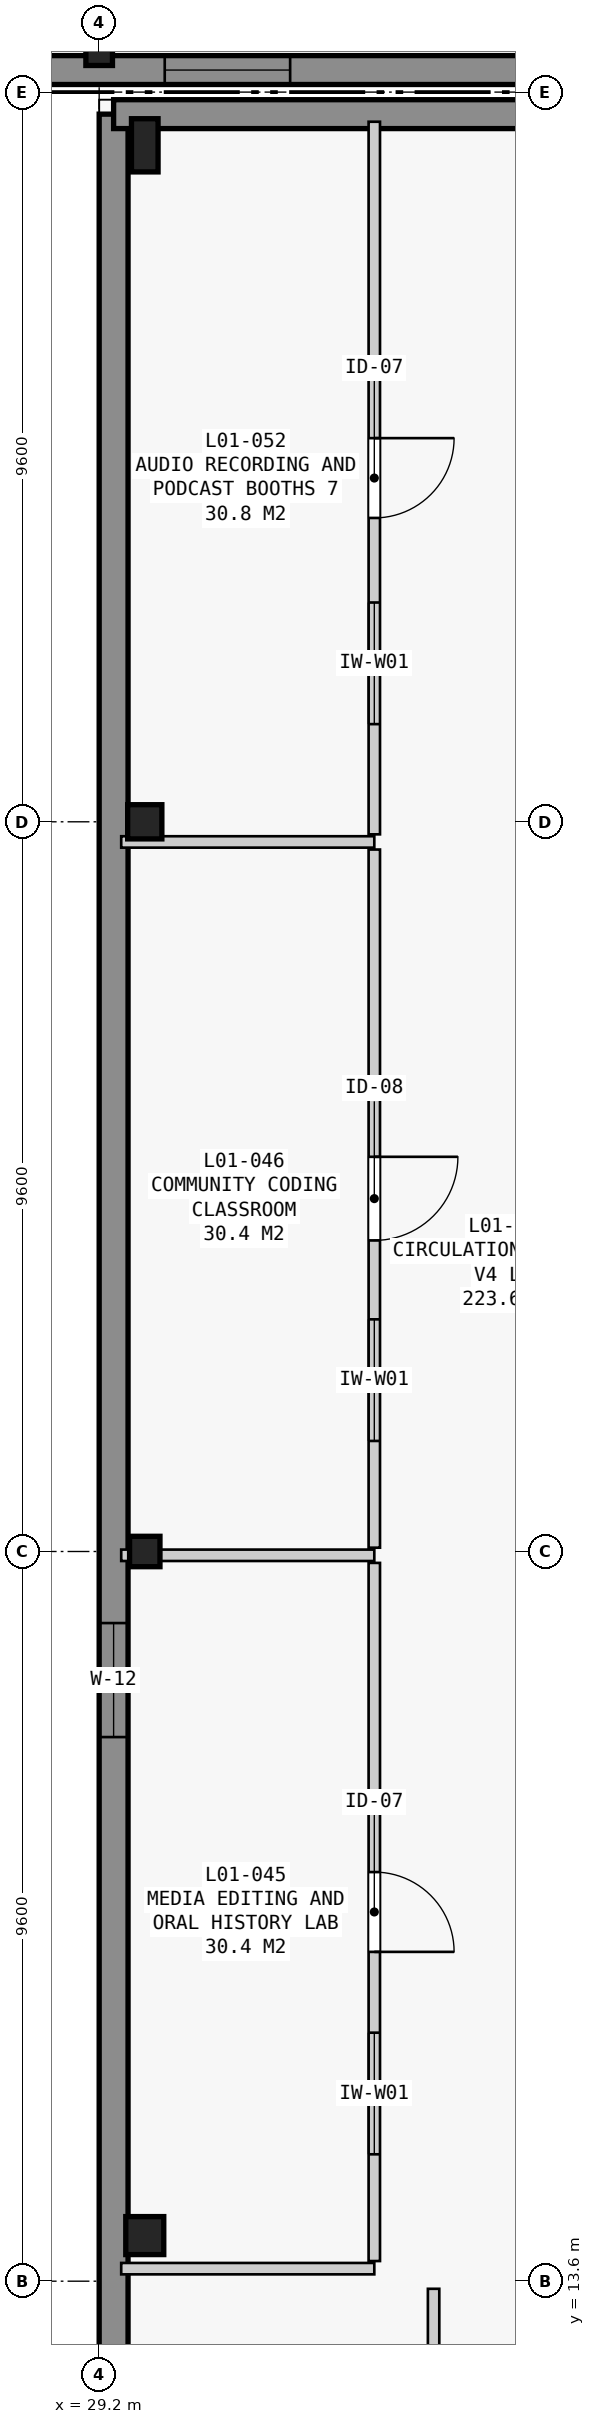
"""IFC4 building model, lengths in metres.
Left out: names, types, materials, properties, quantities, classifications, styles, units other than length and angle.
Written with IfcOpenShell. Run it as: python <this file> out.ifc"""

import sys

from ifc_helpers import new_model, si_unit, direction, frame, frame_2d, origin, origin_2d, place, context, subcontext, project, spatial, rectangle, extrude, element, fill, save


model = new_model("IFC4")
c1 = context("Model", 3, precision=1e-05, world=origin(), true_north=direction((0.0, 1.0)))
c2 = subcontext(c1, "Body", "Model", "MODEL_VIEW")
j1 = project(units=[si_unit("LENGTHUNIT", "METRE"), si_unit("PLANEANGLEUNIT", "RADIAN")], contexts=[c1])
p1 = place(None, origin())
s1 = spatial("IfcSite", under=j1, at=p1, CompositionType="ELEMENT")
p2 = place(p1, origin())
s2 = spatial("IfcBuilding", under=s1, at=p2, CompositionType="ELEMENT")
p3 = place(p2, frame((0.0, 0.0, 5.4)))
s3 = spatial("IfcBuildingStorey", under=s2, at=p3, CompositionType="ELEMENT", Elevation=5.4)
p4 = place(p3, frame((29.8, 14.2, 0.0), z_axis=(0.0, 0.0, 1.0), x_axis=(1.0, 0.0, 0.0)))
e1 = element("IfcColumn", 1, at=p4, inside=s3, PredefinedType="COLUMN", context=c2, shape_type="SweptSolid", body=[
    extrude(rectangle(XDim=0.5, YDim=0.5, at=origin_2d()), origin(), (0.0, 0.0, 1.0), 4.2),
])
p5 = place(p3, frame((29.8, 23.2, 0.0), z_axis=(0.0, 0.0, 1.0), x_axis=(1.0, 0.0, 0.0)))
e2 = element("IfcColumn", 2, at=p5, inside=s3, PredefinedType="COLUMN", context=c2, shape_type="SweptSolid", body=[
    extrude(rectangle(XDim=0.4, YDim=0.4, at=origin_2d()), origin(), (0.0, 0.0, 1.0), 4.2),
])
p6 = place(p3, frame((29.8, 32.8, 0.0), z_axis=(0.0, 0.0, 1.0), x_axis=(1.0, 0.0, 0.0)))
e3 = element("IfcColumn", 3, at=p6, inside=s3, PredefinedType="COLUMN", context=c2, shape_type="SweptSolid", body=[
    extrude(rectangle(XDim=0.45, YDim=0.45, at=origin_2d()), origin(), (0.0, 0.0, 1.0), 4.2),
])
for number, where, z_axis, x_axis in (
    (4, (29.8, 41.7, 0.0), (0.0, 0.0, 1.0), (1.0, 0.0, 0.0)),
    (5, (29.2, 43.1, 0.0), (0.0, 0.0, 1.0), (1.0, 0.0, 0.0)),
):
    element("IfcColumn", number, at=place(p3, frame(where, z_axis=z_axis, x_axis=x_axis)), inside=s3, PredefinedType="COLUMN", context=c2, shape_type="SweptSolid", body=[
        extrude(rectangle(XDim=0.35, YDim=0.7, at=origin_2d()), origin(), (0.0, 0.0, 1.0), 4.2),
    ])
p7 = place(p3, frame((29.39, 4.19, 0.0), z_axis=(0.0, 0.0, 1.0), x_axis=(0.0, 1.0, 0.0)))
e6 = element("IfcWall", 6, at=p7, inside=s3, PredefinedType="STANDARD", context=c2, shape_type="SweptSolid", body=[
    extrude(rectangle(XDim=37.92, YDim=0.38, at=frame_2d((18.96, 0.0))), origin(), (0.0, 0.0, 1.0), 3.94),
])
p8 = place(p7, frame((16.568, 0.0, 0.96)))
e7 = element("IfcOpeningElement", 7, at=p8, cuts=e6, PredefinedType="OPENING", context=c2, shape_type="SweptSolid", body=[
    extrude(rectangle(XDim=1.5, YDim=2.6, at=frame_2d((0.75, 1.3))), frame((0.0, 0.2, 0.0), z_axis=(0.0, -1.0, 0.0), x_axis=(1.0, 0.0, 0.0)), (0.0, 0.0, 1.0), 0.4),
])
p9 = place(p3, frame((29.39, 42.11, 0.0), z_axis=(0.0, 0.0, 1.0), x_axis=(1.0, 0.0, 0.0)))
e8 = element("IfcWall", 8, at=p9, inside=s3, PredefinedType="STANDARD", context=c2, shape_type="SweptSolid", body=[
    extrude(rectangle(XDim=24.72, YDim=0.38, at=frame_2d((12.36, 0.0))), origin(), (0.0, 0.0, 1.0), 3.94),
])
p10 = place(p9, frame((10.91, 0.0, 0.0)))
e9 = element("IfcOpeningElement", 9, at=p10, cuts=e8, PredefinedType="OPENING", context=c2, shape_type="SweptSolid", body=[
    extrude(rectangle(XDim=1.8, YDim=2.2, at=frame_2d((0.9, 1.1))), frame((0.0, 0.2, 0.0), z_axis=(0.0, -1.0, 0.0), x_axis=(1.0, 0.0, 0.0)), (0.0, 0.0, 1.0), 0.4),
])
p11 = place(p3, frame((45.71, 42.69, 0.0), z_axis=(0.0, 0.0, 1.0), x_axis=(-1.0, 0.0, 0.0)))
e10 = element("IfcWall", 10, at=p11, inside=s3, PredefinedType="STANDARD", context=c2, shape_type="SweptSolid", body=[
    extrude(rectangle(XDim=33.12, YDim=0.38, at=frame_2d((16.56, 0.0))), origin(), (0.0, 0.0, 1.0), 3.94),
])
p12 = place(p11, frame((3.61, 0.0, 0.0)))
e11 = element("IfcOpeningElement", 11, at=p12, cuts=e10, PredefinedType="OPENING", context=c2, shape_type="SweptSolid", body=[
    extrude(rectangle(XDim=1.8, YDim=2.2, at=frame_2d((0.9, 1.1))), frame((0.0, 0.2, 0.0), z_axis=(0.0, -1.0, 0.0), x_axis=(1.0, 0.0, 0.0)), (0.0, 0.0, 1.0), 0.4),
])
p13 = place(p11, frame((13.997, 0.0, 1.05)))
e12 = element("IfcOpeningElement", 12, at=p13, cuts=e10, PredefinedType="OPENING", context=c2, shape_type="SweptSolid", body=[
    extrude(rectangle(XDim=1.65, YDim=2.2, at=frame_2d((0.825, 1.1))), frame((0.0, 0.2, 0.0), z_axis=(0.0, -1.0, 0.0), x_axis=(1.0, 0.0, 0.0)), (0.0, 0.0, 1.0), 0.4),
])
p14 = place(p3, frame((33.6, 13.5, 0.0), z_axis=(0.0, 0.0, 1.0), x_axis=(0.0, -1.0, 0.0)))
e13 = element("IfcWall", 13, at=p14, inside=s3, PredefinedType="PARTITIONING", context=c2, shape_type="SweptSolid", body=[
    extrude(rectangle(XDim=1.5, YDim=0.15, at=frame_2d((0.75, 0.0))), origin(), (0.0, 0.0, 1.0), 3.94),
])
p15 = place(p3, frame((29.49, 13.765, 0.0), z_axis=(0.0, 0.0, 1.0), x_axis=(1.0, 0.0, 0.0)))
e14 = element("IfcWall", 14, at=p15, inside=s3, PredefinedType="PARTITIONING", context=c2, shape_type="SweptSolid", body=[
    extrude(rectangle(XDim=3.33, YDim=0.15, at=frame_2d((1.665, 0.0))), origin(), (0.0, 0.0, 1.0), 3.22),
])
p16 = place(p3, frame((29.49, 23.15, 0.0), z_axis=(0.0, 0.0, 1.0), x_axis=(1.0, 0.0, 0.0)))
e15 = element("IfcWall", 15, at=p16, inside=s3, PredefinedType="PARTITIONING", context=c2, shape_type="SweptSolid", body=[
    extrude(rectangle(XDim=3.33, YDim=0.15, at=frame_2d((1.665, 0.0))), origin(), (0.0, 0.0, 1.0), 3.37),
])
p17 = place(p3, frame((32.82, 23.05, 0.0), z_axis=(0.0, 0.0, 1.0), x_axis=(0.0, -1.0, 0.0)))
e16 = element("IfcWall", 16, at=p17, inside=s3, PredefinedType="PARTITIONING", context=c2, shape_type="SweptSolid", body=[
    extrude(rectangle(XDim=9.185, YDim=0.15, at=frame_2d((4.593, 0.0))), origin(), (0.0, 0.0, 1.0), 3.32),
])
p18 = place(p17, frame((4.067, 0.0, 0.0)))
e17 = element("IfcOpeningElement", 17, at=p18, cuts=e16, PredefinedType="OPENING", context=c2, shape_type="SweptSolid", body=[
    extrude(rectangle(XDim=1.05, YDim=2.2, at=frame_2d((0.525, 1.1))), frame((0.0, 0.085, 0.0), z_axis=(0.0, -1.0, 0.0), x_axis=(1.0, 0.0, 0.0)), (0.0, 0.0, 1.0), 0.17),
])
p19 = place(p17, frame((6.181, 0.0, 1.05)))
e18 = element("IfcOpeningElement", 18, at=p19, cuts=e16, PredefinedType="OPENING", context=c2, shape_type="SweptSolid", body=[
    extrude(rectangle(XDim=1.6, YDim=1.5, at=frame_2d((0.8, 0.75))), frame((0.0, 0.085, 0.0), z_axis=(0.0, -1.0, 0.0), x_axis=(1.0, 0.0, 0.0)), (0.0, 0.0, 1.0), 0.17),
])
p20 = place(p3, frame((29.49, 32.535, 0.0), z_axis=(0.0, 0.0, 1.0), x_axis=(1.0, 0.0, 0.0)))
e19 = element("IfcWall", 19, at=p20, inside=s3, PredefinedType="PARTITIONING", context=c2, shape_type="SweptSolid", body=[
    extrude(rectangle(XDim=3.33, YDim=0.15, at=frame_2d((1.665, 0.0))), origin(), (0.0, 0.0, 1.0), 3.22),
])
p21 = place(p3, frame((32.82, 32.435, 0.0), z_axis=(0.0, 0.0, 1.0), x_axis=(0.0, -1.0, 0.0)))
e20 = element("IfcWall", 20, at=p21, inside=s3, PredefinedType="PARTITIONING", context=c2, shape_type="SweptSolid", body=[
    extrude(rectangle(XDim=9.185, YDim=0.15, at=frame_2d((4.593, 0.0))), origin(), (0.0, 0.0, 1.0), 3.37),
])
p22 = place(p21, frame((4.042, 0.0, 0.0)))
e21 = element("IfcOpeningElement", 21, at=p22, cuts=e20, PredefinedType="OPENING", context=c2, shape_type="SweptSolid", body=[
    extrude(rectangle(XDim=1.1, YDim=2.2, at=frame_2d((0.55, 1.1))), frame((0.0, 0.085, 0.0), z_axis=(0.0, -1.0, 0.0), x_axis=(1.0, 0.0, 0.0)), (0.0, 0.0, 1.0), 0.17),
])
p23 = place(p21, frame((6.181, 0.0, 1.05)))
e22 = element("IfcOpeningElement", 22, at=p23, cuts=e20, PredefinedType="OPENING", context=c2, shape_type="SweptSolid", body=[
    extrude(rectangle(XDim=1.6, YDim=1.5, at=frame_2d((0.8, 0.75))), frame((0.0, 0.085, 0.0), z_axis=(0.0, -1.0, 0.0), x_axis=(1.0, 0.0, 0.0)), (0.0, 0.0, 1.0), 0.17),
])
p24 = place(p3, frame((32.82, 42.01, 0.0), z_axis=(0.0, 0.0, 1.0), x_axis=(0.0, -1.0, 0.0)))
e23 = element("IfcWall", 23, at=p24, inside=s3, PredefinedType="PARTITIONING", context=c2, shape_type="SweptSolid", body=[
    extrude(rectangle(XDim=9.375, YDim=0.15, at=frame_2d((4.688, 0.0))), origin(), (0.0, 0.0, 1.0), 3.32),
])
p25 = place(p24, frame((4.163, 0.0, 0.0)))
e24 = element("IfcOpeningElement", 24, at=p25, cuts=e23, PredefinedType="OPENING", context=c2, shape_type="SweptSolid", body=[
    extrude(rectangle(XDim=1.05, YDim=2.2, at=frame_2d((0.525, 1.1))), frame((0.0, 0.085, 0.0), z_axis=(0.0, -1.0, 0.0), x_axis=(1.0, 0.0, 0.0)), (0.0, 0.0, 1.0), 0.17),
])
p26 = place(p24, frame((6.325, 0.0, 1.05)))
e25 = element("IfcOpeningElement", 25, at=p26, cuts=e23, PredefinedType="OPENING", context=c2, shape_type="SweptSolid", body=[
    extrude(rectangle(XDim=1.6, YDim=1.5, at=frame_2d((0.8, 0.75))), frame((0.0, 0.085, 0.0), z_axis=(0.0, -1.0, 0.0), x_axis=(1.0, 0.0, 0.0)), (0.0, 0.0, 1.0), 0.17),
])
p27 = place(p8, origin())
e26 = element("IfcWindow", 26, at=p27, inside=s3, PartitioningType="SINGLE_PANEL", PredefinedType="WINDOW", context=c2, shape_type="SweptSolid", body=[
    extrude(rectangle(XDim=1.5, YDim=2.6, at=frame_2d((0.75, 1.3))), frame((0.0, 0.03, 0.0), z_axis=(0.0, -1.0, 0.0), x_axis=(1.0, 0.0, 0.0)), (0.0, 0.0, 1.0), 0.06),
])
fill(e7, e26)
p28 = place(p13, origin())
e27 = element("IfcWindow", 27, at=p28, inside=s3, PartitioningType="SINGLE_PANEL", PredefinedType="WINDOW", context=c2, shape_type="SweptSolid", body=[
    extrude(rectangle(XDim=1.65, YDim=2.2, at=frame_2d((0.825, 1.1))), frame((0.0, 0.03, 0.0), z_axis=(0.0, -1.0, 0.0), x_axis=(1.0, 0.0, 0.0)), (0.0, 0.0, 1.0), 0.06),
])
fill(e12, e27)
p29 = place(p18, origin())
e28 = element("IfcDoor", 28, at=p29, inside=s3, OperationType="SINGLE_SWING_RIGHT", PredefinedType="DOOR", context=c2, shape_type="SweptSolid", body=[
    extrude(rectangle(XDim=1.05, YDim=2.2, at=frame_2d((0.525, 1.1))), frame((0.0, 0.025, 0.0), z_axis=(0.0, -1.0, 0.0), x_axis=(1.0, 0.0, 0.0)), (0.0, 0.0, 1.0), 0.05),
])
fill(e17, e28)
p30 = place(p19, origin())
e29 = element("IfcWindow", 29, at=p30, inside=s3, PartitioningType="SINGLE_PANEL", PredefinedType="WINDOW", context=c2, shape_type="SweptSolid", body=[
    extrude(rectangle(XDim=1.6, YDim=1.5, at=frame_2d((0.8, 0.75))), frame((0.0, 0.03, 0.0), z_axis=(0.0, -1.0, 0.0), x_axis=(1.0, 0.0, 0.0)), (0.0, 0.0, 1.0), 0.06),
])
fill(e18, e29)
p31 = place(p22, origin())
e30 = element("IfcDoor", 30, at=p31, inside=s3, OperationType="SINGLE_SWING_LEFT", PredefinedType="DOOR", context=c2, shape_type="SweptSolid", body=[
    extrude(rectangle(XDim=1.1, YDim=2.2, at=frame_2d((0.55, 1.1))), frame((0.0, 0.025, 0.0), z_axis=(0.0, -1.0, 0.0), x_axis=(1.0, 0.0, 0.0)), (0.0, 0.0, 1.0), 0.05),
])
fill(e21, e30)
p32 = place(p23, origin())
e31 = element("IfcWindow", 31, at=p32, inside=s3, PartitioningType="SINGLE_PANEL", PredefinedType="WINDOW", context=c2, shape_type="SweptSolid", body=[
    extrude(rectangle(XDim=1.6, YDim=1.5, at=frame_2d((0.8, 0.75))), frame((0.0, 0.03, 0.0), z_axis=(0.0, -1.0, 0.0), x_axis=(1.0, 0.0, 0.0)), (0.0, 0.0, 1.0), 0.06),
])
fill(e22, e31)
p33 = place(p25, origin())
e32 = element("IfcDoor", 32, at=p33, inside=s3, OperationType="SINGLE_SWING_LEFT", PredefinedType="DOOR", context=c2, shape_type="SweptSolid", body=[
    extrude(rectangle(XDim=1.05, YDim=2.2, at=frame_2d((0.525, 1.1))), frame((0.0, 0.025, 0.0), z_axis=(0.0, -1.0, 0.0), x_axis=(1.0, 0.0, 0.0)), (0.0, 0.0, 1.0), 0.05),
])
fill(e24, e32)
p34 = place(p26, origin())
e33 = element("IfcWindow", 33, at=p34, inside=s3, PartitioningType="SINGLE_PANEL", PredefinedType="WINDOW", context=c2, shape_type="SweptSolid", body=[
    extrude(rectangle(XDim=1.6, YDim=1.5, at=frame_2d((0.8, 0.75))), frame((0.0, 0.03, 0.0), z_axis=(0.0, -1.0, 0.0), x_axis=(1.0, 0.0, 0.0)), (0.0, 0.0, 1.0), 0.06),
])
fill(e25, e33)
save(model, sys.argv[1])
